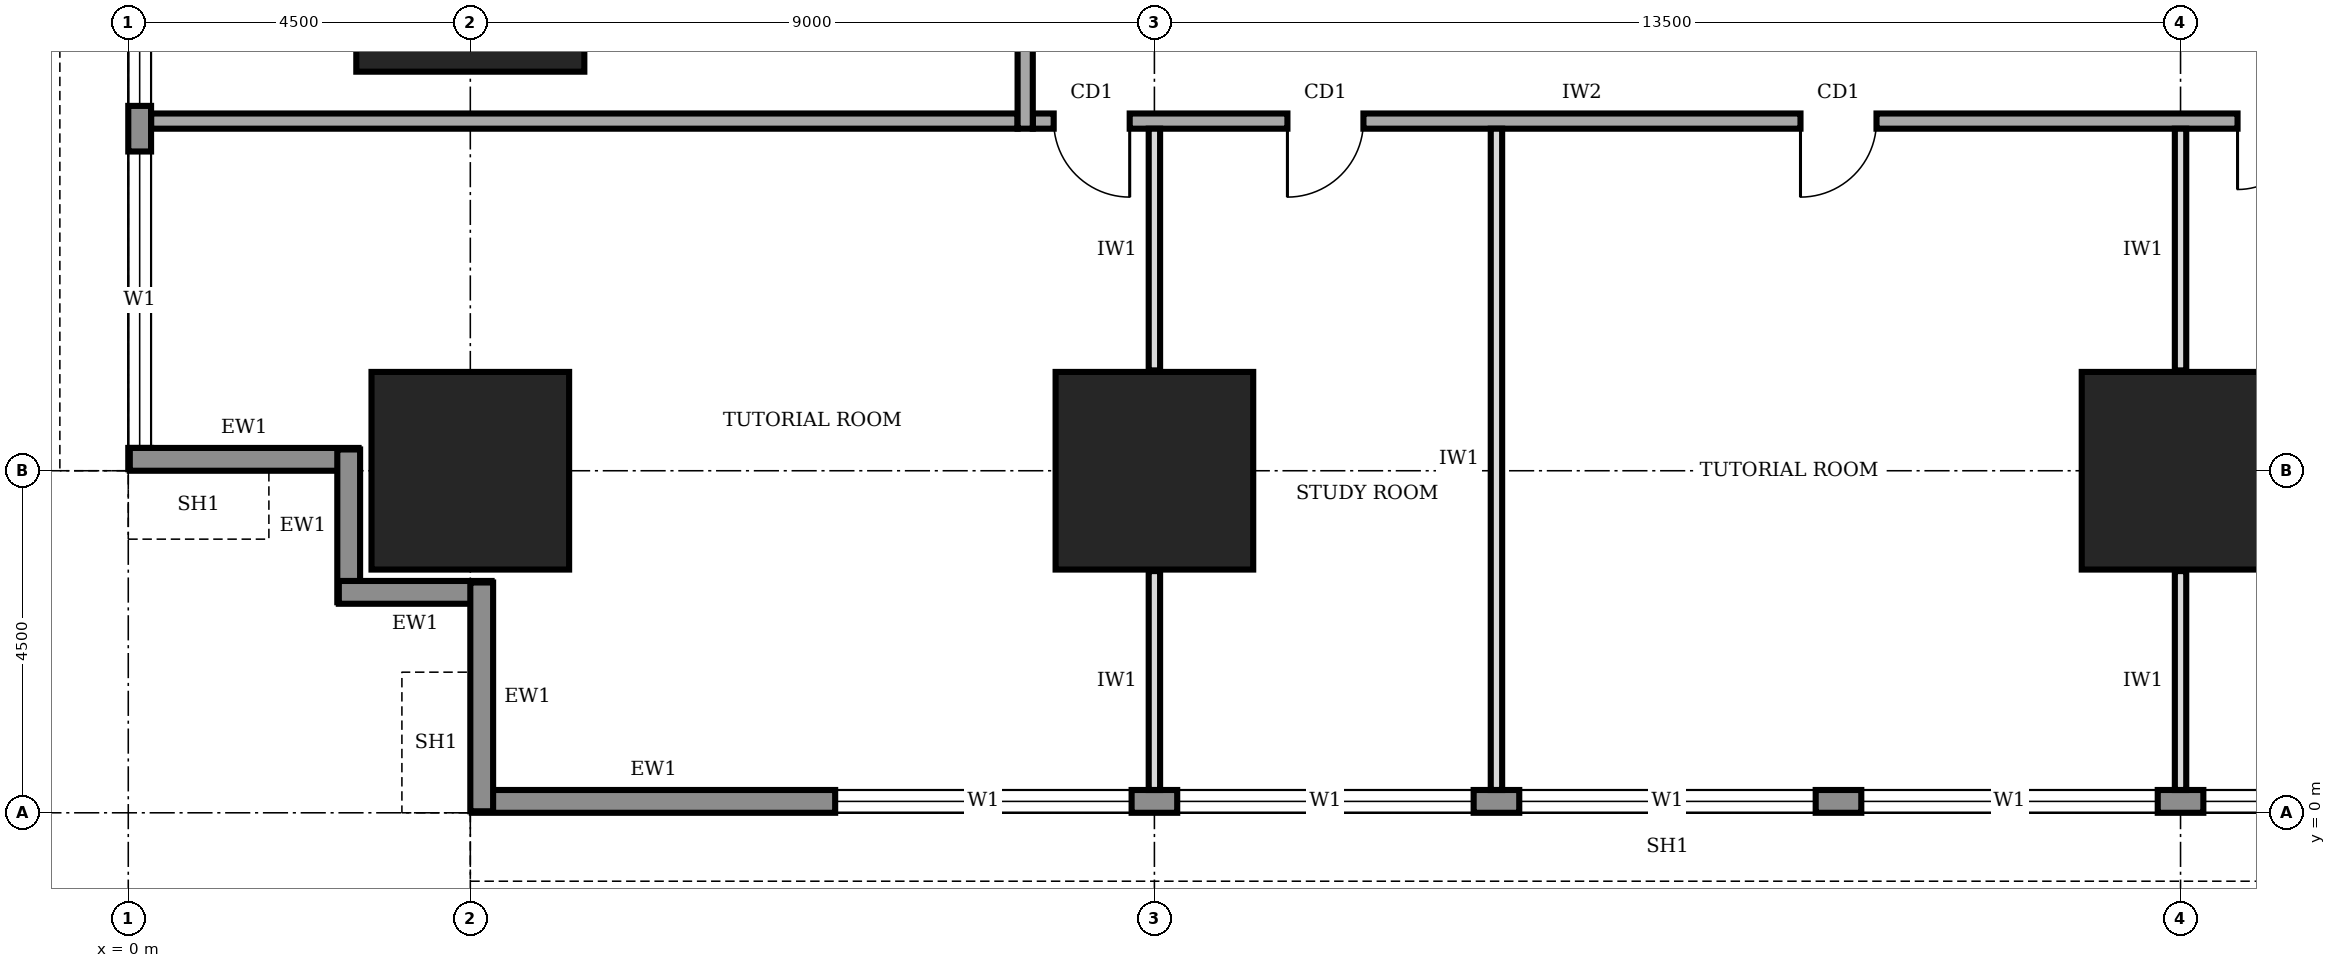
"""IFC4 building model, lengths in metres.
Left out: names, types, materials, properties, quantities, classifications, styles, units other than length and angle.
Written with IfcOpenShell. Run it as: python <this file> out.ifc"""

import sys

from ifc_helpers import new_model, si_unit, direction, frame, frame_2d, origin, origin_2d, place, context, subcontext, project, spatial, rectangle, extrude, element, fill, save


model = new_model("IFC4")
c1 = context("Model", 3, precision=1e-05, world=origin(), true_north=direction((0.0, 1.0)))
c2 = subcontext(c1, "Body", "Model", "MODEL_VIEW")
j1 = project(units=[si_unit("LENGTHUNIT", "METRE"), si_unit("PLANEANGLEUNIT", "RADIAN")], contexts=[c1])
p1 = place(None, origin())
s1 = spatial("IfcSite", under=j1, at=p1, CompositionType="ELEMENT")
p2 = place(p1, origin())
s2 = spatial("IfcBuilding", under=s1, at=p2, CompositionType="ELEMENT")
p3 = place(p2, frame((0.0, 0.0, 45.0)))
s3 = spatial("IfcBuildingStorey", under=s2, at=p3, CompositionType="ELEMENT", Elevation=45.0)
for number, where, z_axis, x_axis in (
    (1, (4.5, 4.5, 0.0), (0.0, 0.0, 1.0), (1.0, 0.0, 0.0)),
    (2, (13.5, 4.5, 0.0), (0.0, 0.0, 1.0), (1.0, 0.0, 0.0)),
    (3, (27.0, 4.5, 0.0), (0.0, 0.0, 1.0), (1.0, 0.0, 0.0)),
):
    element("IfcColumn", number, at=place(p3, frame(where, z_axis=z_axis, x_axis=x_axis)), inside=s3, PredefinedType="COLUMN", context=c2, shape_type="SweptSolid", body=[
        extrude(rectangle(XDim=2.6, YDim=2.6, at=origin_2d()), origin(), (0.0, 0.0, 1.0), 4.0),
    ])
p4 = place(p3, frame((4.5, 11.25, 0.0), z_axis=(0.0, 0.0, 1.0), x_axis=(1.0, 0.0, 0.0)))
e4 = element("IfcColumn", 4, at=p4, inside=s3, PredefinedType="COLUMN", context=c2, shape_type="SweptSolid", body=[
    extrude(rectangle(XDim=3.0, YDim=3.0, at=origin_2d()), origin(), (0.0, 0.0, 1.0), 4.0),
])
p5 = place(p3, frame((4.52, 0.15, 0.0), z_axis=(0.0, 0.0, 1.0), x_axis=(1.0, 0.0, 0.0)))
e5 = element("IfcWall", 5, at=p5, inside=s3, PredefinedType="STANDARD", context=c2, shape_type="SweptSolid", body=[
    extrude(rectangle(XDim=31.46, YDim=0.3, at=frame_2d((15.73, 0.0))), origin(), (0.0, 0.0, 1.0), 3.75),
])
p6 = place(p5, frame((4.78, 0.0, 0.9)))
e6 = element("IfcOpeningElement", 6, at=p6, cuts=e5, PredefinedType="OPENING", context=c2, shape_type="SweptSolid", body=[
    extrude(rectangle(XDim=3.9, YDim=2.2, at=frame_2d((1.95, 1.1))), frame((0.0, 0.16, 0.0), z_axis=(0.0, -1.0, 0.0), x_axis=(1.0, 0.0, 0.0)), (0.0, 0.0, 1.0), 0.32),
])
p7 = place(p5, frame((9.28, 0.0, 0.9)))
e7 = element("IfcOpeningElement", 7, at=p7, cuts=e5, PredefinedType="OPENING", context=c2, shape_type="SweptSolid", body=[
    extrude(rectangle(XDim=3.9, YDim=2.2, at=frame_2d((1.95, 1.1))), frame((0.0, 0.16, 0.0), z_axis=(0.0, -1.0, 0.0), x_axis=(1.0, 0.0, 0.0)), (0.0, 0.0, 1.0), 0.32),
])
p8 = place(p5, frame((13.78, 0.0, 0.9)))
e8 = element("IfcOpeningElement", 8, at=p8, cuts=e5, PredefinedType="OPENING", context=c2, shape_type="SweptSolid", body=[
    extrude(rectangle(XDim=3.9, YDim=2.2, at=frame_2d((1.95, 1.1))), frame((0.0, 0.16, 0.0), z_axis=(0.0, -1.0, 0.0), x_axis=(1.0, 0.0, 0.0)), (0.0, 0.0, 1.0), 0.32),
])
p9 = place(p5, frame((18.28, 0.0, 0.9)))
e9 = element("IfcOpeningElement", 9, at=p9, cuts=e5, PredefinedType="OPENING", context=c2, shape_type="SweptSolid", body=[
    extrude(rectangle(XDim=3.9, YDim=2.2, at=frame_2d((1.95, 1.1))), frame((0.0, 0.16, 0.0), z_axis=(0.0, -1.0, 0.0), x_axis=(1.0, 0.0, 0.0)), (0.0, 0.0, 1.0), 0.32),
])
p10 = place(p5, frame((22.78, 0.0, 0.9)))
e10 = element("IfcOpeningElement", 10, at=p10, cuts=e5, PredefinedType="OPENING", context=c2, shape_type="SweptSolid", body=[
    extrude(rectangle(XDim=3.9, YDim=2.2, at=frame_2d((1.95, 1.1))), frame((0.0, 0.16, 0.0), z_axis=(0.0, -1.0, 0.0), x_axis=(1.0, 0.0, 0.0)), (0.0, 0.0, 1.0), 0.32),
])
p11 = place(p5, frame((27.28, 0.0, 0.9)))
e11 = element("IfcOpeningElement", 11, at=p11, cuts=e5, PredefinedType="OPENING", context=c2, shape_type="SweptSolid", body=[
    extrude(rectangle(XDim=3.9, YDim=2.2, at=frame_2d((1.95, 1.1))), frame((0.0, 0.16, 0.0), z_axis=(0.0, -1.0, 0.0), x_axis=(1.0, 0.0, 0.0)), (0.0, 0.0, 1.0), 0.32),
])
p12 = place(p3, frame((0.15, 35.98, 0.0), z_axis=(0.0, 0.0, 1.0), x_axis=(0.0, -1.0, 0.0)))
e12 = element("IfcWall", 12, at=p12, inside=s3, PredefinedType="STANDARD", context=c2, shape_type="SweptSolid", body=[
    extrude(rectangle(XDim=31.46, YDim=0.3, at=frame_2d((15.73, 0.0))), origin(), (0.0, 0.0, 1.0), 3.75),
])
p13 = place(p12, frame((27.28, 0.0, 0.9)))
e13 = element("IfcOpeningElement", 13, at=p13, cuts=e12, PredefinedType="OPENING", context=c2, shape_type="SweptSolid", body=[
    extrude(rectangle(XDim=3.9, YDim=2.2, at=frame_2d((1.95, 1.1))), frame((0.0, 0.16, 0.0), z_axis=(0.0, -1.0, 0.0), x_axis=(1.0, 0.0, 0.0)), (0.0, 0.0, 1.0), 0.32),
])
p14 = place(p12, frame((22.78, 0.0, 0.9)))
e14 = element("IfcOpeningElement", 14, at=p14, cuts=e12, PredefinedType="OPENING", context=c2, shape_type="SweptSolid", body=[
    extrude(rectangle(XDim=3.9, YDim=2.2, at=frame_2d((1.95, 1.1))), frame((0.0, 0.16, 0.0), z_axis=(0.0, -1.0, 0.0), x_axis=(1.0, 0.0, 0.0)), (0.0, 0.0, 1.0), 0.32),
])
p15 = place(p12, frame((18.28, 0.0, 0.9)))
e15 = element("IfcOpeningElement", 15, at=p15, cuts=e12, PredefinedType="OPENING", context=c2, shape_type="SweptSolid", body=[
    extrude(rectangle(XDim=3.9, YDim=2.2, at=frame_2d((1.95, 1.1))), frame((0.0, 0.16, 0.0), z_axis=(0.0, -1.0, 0.0), x_axis=(1.0, 0.0, 0.0)), (0.0, 0.0, 1.0), 0.32),
])
p16 = place(p12, frame((13.78, 0.0, 0.9)))
e16 = element("IfcOpeningElement", 16, at=p16, cuts=e12, PredefinedType="OPENING", context=c2, shape_type="SweptSolid", body=[
    extrude(rectangle(XDim=3.9, YDim=2.2, at=frame_2d((1.95, 1.1))), frame((0.0, 0.16, 0.0), z_axis=(0.0, -1.0, 0.0), x_axis=(1.0, 0.0, 0.0)), (0.0, 0.0, 1.0), 0.32),
])
p17 = place(p12, frame((9.28, 0.0, 0.9)))
e17 = element("IfcOpeningElement", 17, at=p17, cuts=e12, PredefinedType="OPENING", context=c2, shape_type="SweptSolid", body=[
    extrude(rectangle(XDim=3.9, YDim=2.2, at=frame_2d((1.95, 1.1))), frame((0.0, 0.16, 0.0), z_axis=(0.0, -1.0, 0.0), x_axis=(1.0, 0.0, 0.0)), (0.0, 0.0, 1.0), 0.32),
])
p18 = place(p12, frame((4.78, 0.0, 0.9)))
e18 = element("IfcOpeningElement", 18, at=p18, cuts=e12, PredefinedType="OPENING", context=c2, shape_type="SweptSolid", body=[
    extrude(rectangle(XDim=3.9, YDim=2.2, at=frame_2d((1.95, 1.1))), frame((0.0, 0.16, 0.0), z_axis=(0.0, -1.0, 0.0), x_axis=(1.0, 0.0, 0.0)), (0.0, 0.0, 1.0), 0.32),
])
p19 = place(p3, frame((0.02, 4.65, 0.0), z_axis=(0.0, 0.0, 1.0), x_axis=(1.0, 0.0, 0.0)))
e19 = element("IfcWall", 19, at=p19, inside=s3, PredefinedType="STANDARD", context=c2, shape_type="SweptSolid", body=[
    extrude(rectangle(XDim=3.01, YDim=0.3, at=frame_2d((1.505, 0.0))), origin(), (0.0, 0.0, 1.0), 2.85),
])
for number, where, z_axis, x_axis in (
    (20, (2.9, 4.78, 0.0), (0.0, 0.0, 1.0), (0.0, -1.0, 0.0)),
    (21, (2.77, 2.9, 0.0), (0.0, 0.0, 1.0), (1.0, 0.0, 0.0)),
):
    element("IfcWall", number, at=place(p3, frame(where, z_axis=z_axis, x_axis=x_axis)), inside=s3, PredefinedType="STANDARD", context=c2, shape_type="SweptSolid", body=[
        extrude(rectangle(XDim=2.01, YDim=0.3, at=frame_2d((1.005, 0.0))), origin(), (0.0, 0.0, 1.0), 3.75),
    ])
p20 = place(p3, frame((4.65, 3.03, 0.0), z_axis=(0.0, 0.0, 1.0), x_axis=(0.0, -1.0, 0.0)))
e22 = element("IfcWall", 22, at=p20, inside=s3, PredefinedType="STANDARD", context=c2, shape_type="SweptSolid", body=[
    extrude(rectangle(XDim=3.01, YDim=0.3, at=frame_2d((1.505, 0.0))), origin(), (0.0, 0.0, 1.0), 2.85),
])
p21 = place(p3, frame((11.9, 9.1, 0.0), z_axis=(0.0, 0.0, 1.0), x_axis=(1.0, 0.0, 0.0)))
e23 = element("IfcWall", 23, at=p21, inside=s3, PredefinedType="SOLIDWALL", context=c2, shape_type="SweptSolid", body=[
    extrude(rectangle(XDim=18.4, YDim=0.2, at=frame_2d((9.2, 0.0))), origin(), (0.0, 0.0, 1.0), 3.75),
])
p22 = place(p21, frame((0.275, 0.0, 0.0)))
e24 = element("IfcOpeningElement", 24, at=p22, cuts=e23, PredefinedType="OPENING", context=c2, shape_type="SweptSolid", body=[
    extrude(rectangle(XDim=1.0, YDim=2.1, at=frame_2d((0.5, 1.05))), frame((0.0, 0.11, 0.0), z_axis=(0.0, -1.0, 0.0), x_axis=(1.0, 0.0, 0.0)), (0.0, 0.0, 1.0), 0.22),
])
p23 = place(p21, frame((3.35, 0.0, 0.0)))
e25 = element("IfcOpeningElement", 25, at=p23, cuts=e23, PredefinedType="OPENING", context=c2, shape_type="SweptSolid", body=[
    extrude(rectangle(XDim=1.0, YDim=2.1, at=frame_2d((0.5, 1.05))), frame((0.0, 0.11, 0.0), z_axis=(0.0, -1.0, 0.0), x_axis=(1.0, 0.0, 0.0)), (0.0, 0.0, 1.0), 0.22),
])
p24 = place(p21, frame((10.1, 0.0, 0.0)))
e26 = element("IfcOpeningElement", 26, at=p24, cuts=e23, PredefinedType="OPENING", context=c2, shape_type="SweptSolid", body=[
    extrude(rectangle(XDim=1.0, YDim=2.1, at=frame_2d((0.5, 1.05))), frame((0.0, 0.11, 0.0), z_axis=(0.0, -1.0, 0.0), x_axis=(1.0, 0.0, 0.0)), (0.0, 0.0, 1.0), 0.22),
])
p25 = place(p21, frame((15.85, 0.0, 0.0)))
e27 = element("IfcOpeningElement", 27, at=p25, cuts=e23, PredefinedType="OPENING", context=c2, shape_type="SweptSolid", body=[
    extrude(rectangle(XDim=1.8, YDim=2.1, at=frame_2d((0.9, 1.05))), frame((0.0, 0.11, 0.0), z_axis=(0.0, -1.0, 0.0), x_axis=(1.0, 0.0, 0.0)), (0.0, 0.0, 1.0), 0.22),
])
p26 = place(p3, frame((11.8, 31.3, 0.0), z_axis=(0.0, 0.0, 1.0), x_axis=(0.0, -1.0, 0.0)))
e28 = element("IfcWall", 28, at=p26, inside=s3, PredefinedType="SOLIDWALL", context=c2, shape_type="SweptSolid", body=[
    extrude(rectangle(XDim=22.3, YDim=0.2, at=frame_2d((11.15, 0.0))), origin(), (0.0, 0.0, 1.0), 3.75),
])
p27 = place(p26, frame((19.55, 0.0, 0.0)))
e29 = element("IfcOpeningElement", 29, at=p27, cuts=e28, PredefinedType="OPENING", context=c2, shape_type="SweptSolid", body=[
    extrude(rectangle(XDim=1.0, YDim=2.1, at=frame_2d((0.5, 1.05))), frame((0.0, 0.11, 0.0), z_axis=(0.0, -1.0, 0.0), x_axis=(1.0, 0.0, 0.0)), (0.0, 0.0, 1.0), 0.22),
])
p28 = place(p26, frame((16.15, 0.0, 0.0)))
e30 = element("IfcOpeningElement", 30, at=p28, cuts=e28, PredefinedType="OPENING", context=c2, shape_type="SweptSolid", body=[
    extrude(rectangle(XDim=0.9, YDim=2.1, at=frame_2d((0.45, 1.05))), frame((0.0, 0.11, 0.0), z_axis=(0.0, -1.0, 0.0), x_axis=(1.0, 0.0, 0.0)), (0.0, 0.0, 1.0), 0.22),
])
p29 = place(p26, frame((12.95, 0.0, 0.0)))
e31 = element("IfcOpeningElement", 31, at=p29, cuts=e28, PredefinedType="OPENING", context=c2, shape_type="SweptSolid", body=[
    extrude(rectangle(XDim=0.9, YDim=2.1, at=frame_2d((0.45, 1.05))), frame((0.0, 0.11, 0.0), z_axis=(0.0, -1.0, 0.0), x_axis=(1.0, 0.0, 0.0)), (0.0, 0.0, 1.0), 0.22),
])
p30 = place(p26, frame((7.4, 0.0, 0.0)))
e32 = element("IfcOpeningElement", 32, at=p30, cuts=e28, PredefinedType="OPENING", context=c2, shape_type="SweptSolid", body=[
    extrude(rectangle(XDim=0.9, YDim=2.1, at=frame_2d((0.45, 1.05))), frame((0.0, 0.11, 0.0), z_axis=(0.0, -1.0, 0.0), x_axis=(1.0, 0.0, 0.0)), (0.0, 0.0, 1.0), 0.22),
])
p31 = place(p26, frame((4.8, 0.0, 0.0)))
e33 = element("IfcOpeningElement", 33, at=p31, cuts=e28, PredefinedType="OPENING", context=c2, shape_type="SweptSolid", body=[
    extrude(rectangle(XDim=1.0, YDim=2.1, at=frame_2d((0.5, 1.05))), frame((0.0, 0.11, 0.0), z_axis=(0.0, -1.0, 0.0), x_axis=(1.0, 0.0, 0.0)), (0.0, 0.0, 1.0), 0.22),
])
p32 = place(p26, frame((9.9, 0.0, 0.0)))
e34 = element("IfcOpeningElement", 34, at=p32, cuts=e28, PredefinedType="OPENING", context=c2, shape_type="SweptSolid", body=[
    extrude(rectangle(XDim=1.0, YDim=2.1, at=frame_2d((0.5, 1.05))), frame((0.0, 0.11, 0.0), z_axis=(0.0, -1.0, 0.0), x_axis=(1.0, 0.0, 0.0)), (0.0, 0.0, 1.0), 0.22),
])
p33 = place(p26, frame((1.55, 0.0, 0.0)))
e35 = element("IfcOpeningElement", 35, at=p33, cuts=e28, PredefinedType="OPENING", context=c2, shape_type="SweptSolid", body=[
    extrude(rectangle(XDim=1.0, YDim=2.1, at=frame_2d((0.5, 1.05))), frame((0.0, 0.11, 0.0), z_axis=(0.0, -1.0, 0.0), x_axis=(1.0, 0.0, 0.0)), (0.0, 0.0, 1.0), 0.22),
])
p34 = place(p3, frame((0.3, 9.1, 0.0), z_axis=(0.0, 0.0, 1.0), x_axis=(1.0, 0.0, 0.0)))
e36 = element("IfcWall", 36, at=p34, inside=s3, PredefinedType="SOLIDWALL", context=c2, shape_type="SweptSolid", body=[
    extrude(rectangle(XDim=11.4, YDim=0.2, at=frame_2d((5.7, 0.0))), origin(), (0.0, 0.0, 1.0), 3.75),
])
p35 = place(p3, frame((13.5, 0.3, 0.0), z_axis=(0.0, 0.0, 1.0), x_axis=(0.0, 1.0, 0.0)))
e37 = element("IfcWall", 37, at=p35, inside=s3, PredefinedType="PARTITIONING", context=c2, shape_type="SweptSolid", body=[
    extrude(rectangle(XDim=2.88, YDim=0.15, at=frame_2d((1.44, 0.0))), origin(), (0.0, 0.0, 1.0), 2.85),
])
p36 = place(p3, frame((13.5, 5.82, 0.0), z_axis=(0.0, 0.0, 1.0), x_axis=(0.0, 1.0, 0.0)))
e38 = element("IfcWall", 38, at=p36, inside=s3, PredefinedType="PARTITIONING", context=c2, shape_type="SweptSolid", body=[
    extrude(rectangle(XDim=3.18, YDim=0.15, at=frame_2d((1.59, 0.0))), origin(), (0.0, 0.0, 1.0), 2.85),
])
p37 = place(p3, frame((18.0, 0.3, 0.0), z_axis=(0.0, 0.0, 1.0), x_axis=(0.0, 1.0, 0.0)))
e39 = element("IfcWall", 39, at=p37, inside=s3, PredefinedType="PARTITIONING", context=c2, shape_type="SweptSolid", body=[
    extrude(rectangle(XDim=8.7, YDim=0.15, at=frame_2d((4.35, 0.0))), origin(), (0.0, 0.0, 1.0), 3.75),
])
p38 = place(p3, frame((27.0, 0.3, 0.0), z_axis=(0.0, 0.0, 1.0), x_axis=(0.0, 1.0, 0.0)))
e40 = element("IfcWall", 40, at=p38, inside=s3, PredefinedType="PARTITIONING", context=c2, shape_type="SweptSolid", body=[
    extrude(rectangle(XDim=2.88, YDim=0.15, at=frame_2d((1.44, 0.0))), origin(), (0.0, 0.0, 1.0), 2.85),
])
p39 = place(p3, frame((27.0, 5.82, 0.0), z_axis=(0.0, 0.0, 1.0), x_axis=(0.0, 1.0, 0.0)))
e41 = element("IfcWall", 41, at=p39, inside=s3, PredefinedType="PARTITIONING", context=c2, shape_type="SweptSolid", body=[
    extrude(rectangle(XDim=3.18, YDim=0.15, at=frame_2d((1.59, 0.0))), origin(), (0.0, 0.0, 1.0), 2.85),
])
p40 = place(p6, origin())
e42 = element("IfcWindow", 42, at=p40, inside=s3, PartitioningType="SINGLE_PANEL", PredefinedType="WINDOW", context=c2, shape_type="SweptSolid", body=[
    extrude(rectangle(XDim=3.9, YDim=2.2, at=frame_2d((1.95, 1.1))), frame((0.0, 0.03, 0.0), z_axis=(0.0, -1.0, 0.0), x_axis=(1.0, 0.0, 0.0)), (0.0, 0.0, 1.0), 0.06),
])
fill(e6, e42)
p41 = place(p7, origin())
e43 = element("IfcWindow", 43, at=p41, inside=s3, PartitioningType="SINGLE_PANEL", PredefinedType="WINDOW", context=c2, shape_type="SweptSolid", body=[
    extrude(rectangle(XDim=3.9, YDim=2.2, at=frame_2d((1.95, 1.1))), frame((0.0, 0.03, 0.0), z_axis=(0.0, -1.0, 0.0), x_axis=(1.0, 0.0, 0.0)), (0.0, 0.0, 1.0), 0.06),
])
fill(e7, e43)
p42 = place(p8, origin())
e44 = element("IfcWindow", 44, at=p42, inside=s3, PartitioningType="SINGLE_PANEL", PredefinedType="WINDOW", context=c2, shape_type="SweptSolid", body=[
    extrude(rectangle(XDim=3.9, YDim=2.2, at=frame_2d((1.95, 1.1))), frame((0.0, 0.03, 0.0), z_axis=(0.0, -1.0, 0.0), x_axis=(1.0, 0.0, 0.0)), (0.0, 0.0, 1.0), 0.06),
])
fill(e8, e44)
p43 = place(p9, origin())
e45 = element("IfcWindow", 45, at=p43, inside=s3, PartitioningType="SINGLE_PANEL", PredefinedType="WINDOW", context=c2, shape_type="SweptSolid", body=[
    extrude(rectangle(XDim=3.9, YDim=2.2, at=frame_2d((1.95, 1.1))), frame((0.0, 0.03, 0.0), z_axis=(0.0, -1.0, 0.0), x_axis=(1.0, 0.0, 0.0)), (0.0, 0.0, 1.0), 0.06),
])
fill(e9, e45)
p44 = place(p10, origin())
e46 = element("IfcWindow", 46, at=p44, inside=s3, PartitioningType="SINGLE_PANEL", PredefinedType="WINDOW", context=c2, shape_type="SweptSolid", body=[
    extrude(rectangle(XDim=3.9, YDim=2.2, at=frame_2d((1.95, 1.1))), frame((0.0, 0.03, 0.0), z_axis=(0.0, -1.0, 0.0), x_axis=(1.0, 0.0, 0.0)), (0.0, 0.0, 1.0), 0.06),
])
fill(e10, e46)
p45 = place(p13, origin())
e47 = element("IfcWindow", 47, at=p45, inside=s3, PartitioningType="SINGLE_PANEL", PredefinedType="WINDOW", context=c2, shape_type="SweptSolid", body=[
    extrude(rectangle(XDim=3.9, YDim=2.2, at=frame_2d((1.95, 1.1))), frame((0.0, 0.03, 0.0), z_axis=(0.0, -1.0, 0.0), x_axis=(1.0, 0.0, 0.0)), (0.0, 0.0, 1.0), 0.06),
])
fill(e13, e47)
p46 = place(p14, origin())
e48 = element("IfcWindow", 48, at=p46, inside=s3, PartitioningType="SINGLE_PANEL", PredefinedType="WINDOW", context=c2, shape_type="SweptSolid", body=[
    extrude(rectangle(XDim=3.9, YDim=2.2, at=frame_2d((1.95, 1.1))), frame((0.0, 0.03, 0.0), z_axis=(0.0, -1.0, 0.0), x_axis=(1.0, 0.0, 0.0)), (0.0, 0.0, 1.0), 0.06),
])
fill(e14, e48)
p47 = place(p22, frame((1.0, 0.0, 0.0), z_axis=(0.0, 0.0, 1.0), x_axis=(-1.0, 0.0, 0.0)))
e49 = element("IfcDoor", 49, at=p47, inside=s3, OperationType="SINGLE_SWING_LEFT", PredefinedType="DOOR", context=c2, shape_type="SweptSolid", body=[
    extrude(rectangle(XDim=1.0, YDim=2.1, at=frame_2d((0.5, 1.05))), frame((0.0, 0.025, 0.0), z_axis=(0.0, -1.0, 0.0), x_axis=(1.0, 0.0, 0.0)), (0.0, 0.0, 1.0), 0.05),
])
fill(e24, e49)
p48 = place(p23, frame((1.0, 0.0, 0.0), z_axis=(0.0, 0.0, 1.0), x_axis=(-1.0, 0.0, 0.0)))
e50 = element("IfcDoor", 50, at=p48, inside=s3, OperationType="SINGLE_SWING_RIGHT", PredefinedType="DOOR", context=c2, shape_type="SweptSolid", body=[
    extrude(rectangle(XDim=1.0, YDim=2.1, at=frame_2d((0.5, 1.05))), frame((0.0, 0.025, 0.0), z_axis=(0.0, -1.0, 0.0), x_axis=(1.0, 0.0, 0.0)), (0.0, 0.0, 1.0), 0.05),
])
fill(e25, e50)
p49 = place(p24, frame((1.0, 0.0, 0.0), z_axis=(0.0, 0.0, 1.0), x_axis=(-1.0, 0.0, 0.0)))
e51 = element("IfcDoor", 51, at=p49, inside=s3, OperationType="SINGLE_SWING_RIGHT", PredefinedType="DOOR", context=c2, shape_type="SweptSolid", body=[
    extrude(rectangle(XDim=1.0, YDim=2.1, at=frame_2d((0.5, 1.05))), frame((0.0, 0.025, 0.0), z_axis=(0.0, -1.0, 0.0), x_axis=(1.0, 0.0, 0.0)), (0.0, 0.0, 1.0), 0.05),
])
fill(e26, e51)
p50 = place(p25, frame((1.8, 0.0, 0.0), z_axis=(0.0, 0.0, 1.0), x_axis=(-1.0, 0.0, 0.0)))
e52 = element("IfcDoor", 52, at=p50, inside=s3, OperationType="DOUBLE_DOOR_SINGLE_SWING", PredefinedType="DOOR", context=c2, shape_type="SweptSolid", body=[
    extrude(rectangle(XDim=1.8, YDim=2.1, at=frame_2d((0.9, 1.05))), frame((0.0, 0.025, 0.0), z_axis=(0.0, -1.0, 0.0), x_axis=(1.0, 0.0, 0.0)), (0.0, 0.0, 1.0), 0.05),
])
fill(e27, e52)
save(model, sys.argv[1])
